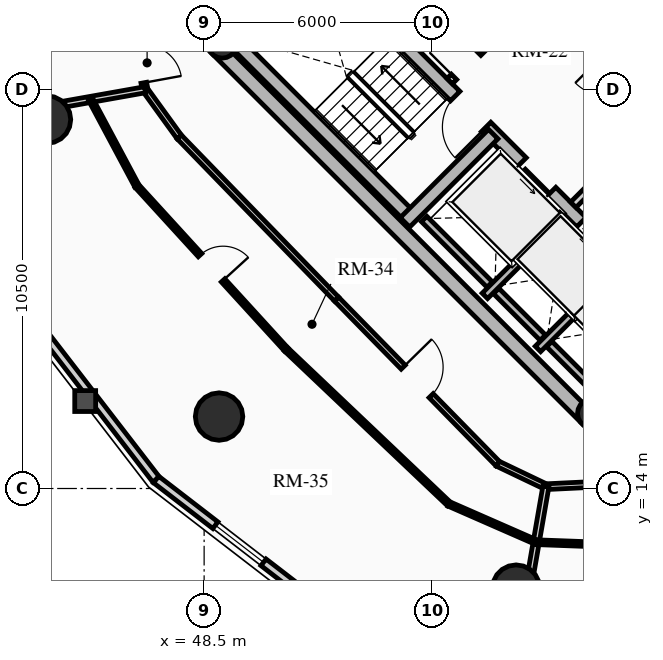
"""IFC4 building model, lengths in metres.
Left out: names, types, materials, properties, quantities, classifications, styles, units other than length and angle.
Written with IfcOpenShell. Run it as: python <this file> out.ifc"""

import sys

from ifc_helpers import new_model, si_unit, direction, frame, frame_2d, origin, origin_2d, place, context, subcontext, project, spatial, rectangle, circle, hollow_circle, extrude, source, transform, mapped, element, fill, save


model = new_model("IFC4")
c1 = context("Model", 3, precision=1e-05, world=origin(), true_north=direction((0.0, 1.0)))
c2 = subcontext(c1, "Body", "Model", "MODEL_VIEW")
j1 = project(units=[si_unit("LENGTHUNIT", "METRE"), si_unit("PLANEANGLEUNIT", "RADIAN")], contexts=[c1])
p1 = place(None, origin())
s1 = spatial("IfcSite", under=j1, at=p1, CompositionType="ELEMENT")
p2 = place(p1, origin())
s2 = spatial("IfcBuilding", under=s1, at=p2, CompositionType="ELEMENT")
p3 = place(p2, frame((0.0, 0.0, 163.24)))
s3 = spatial("IfcBuildingStorey", under=s2, at=p3, CompositionType="ELEMENT", Elevation=163.24)
for number, where, z_axis, x_axis in (
    (1, (58.702, 15.732, 0.0), (0.0, 0.0, 1.0), (-0.707, 0.707, 0.0)),
    (2, (66.268, 23.298, 0.0), (0.0, 0.0, 1.0), (-0.707, 0.707, 0.0)),
):
    element("IfcWall", number, at=place(p3, frame(where, z_axis=z_axis, x_axis=x_axis)), inside=s3, PredefinedType="SHEAR", context=c2, shape_type="SweptSolid", body=[
        extrude(rectangle(XDim=14.1, YDim=0.4, at=frame_2d((7.05, 0.0))), origin(), (0.0, 0.0, 1.0), 2.91),
    ])
p4 = place(p3, frame((58.561, 15.873, 0.0), z_axis=(0.0, 0.0, 1.0), x_axis=(0.707106781187, 0.707106781187, 0.0)))
e3 = element("IfcWall", 3, at=p4, inside=s3, PredefinedType="SHEAR", context=c2, shape_type="SweptSolid", body=[
    extrude(rectangle(XDim=10.7, YDim=0.4, at=frame_2d((5.35, 0.0))), origin(), (0.0, 0.0, 1.0), 2.91),
])
m1 = source(origin(), c2, "Body", "SweptSolid", [
    extrude(rectangle(XDim=1.5, YDim=2.02, at=frame_2d((0.75, 1.01))), frame((0.0, 0.21, 0.0), z_axis=(0.0, -1.0, 0.0), x_axis=(1.0, 0.0, 0.0)), (0.0, 0.0, 1.0), 0.42),
])
p5 = place(p4, frame((5.45, 0.0, 0.0)))
e4 = element("IfcOpeningElement", 4, at=p5, cuts=e3, PredefinedType="OPENING", context=c2, shape_type="MappedRepresentation", body=[
    mapped(m1, transform((0.0, 0.0, 0.0), x_axis=(1.0, 0.0, 0.0), y_axis=(0.0, 1.0, 0.0), z_axis=(0.0, 0.0, 1.0), scale=1.0)),
])
p6 = place(p3, frame((48.873, 25.561, 0.0), z_axis=(0.0, 0.0, 1.0), x_axis=(0.707106781187, 0.707106781187, 0.0)))
e5 = element("IfcWall", 5, at=p6, inside=s3, PredefinedType="SHEAR", context=c2, shape_type="SweptSolid", body=[
    extrude(rectangle(XDim=10.7, YDim=0.4, at=frame_2d((5.35, 0.0))), origin(), (0.0, 0.0, 1.0), 2.91),
])
p7 = place(p6, frame((4.6, 0.0, 0.0)))
e6 = element("IfcOpeningElement", 6, at=p7, cuts=e5, PredefinedType="OPENING", context=c2, shape_type="MappedRepresentation", body=[
    mapped(m1, transform((0.0, 0.0, 0.0), x_axis=(1.0, 0.0, 0.0), y_axis=(0.0, 1.0, 0.0), z_axis=(0.0, 0.0, 1.0), scale=1.0)),
])
p8 = place(p3, frame((61.06, 18.373, 0.0), z_axis=(0.0, 0.0, 1.0), x_axis=(-0.707106781187, 0.707106781187, 0.0)))
e7 = element("IfcWall", 7, at=p8, inside=s3, PredefinedType="SHEAR", context=c2, shape_type="SweptSolid", body=[
    extrude(rectangle(XDim=13.7, YDim=0.35, at=frame_2d((6.85, 0.0))), origin(), (0.0, 0.0, 1.0), 2.91),
])
m2 = source(origin(), c2, "Body", "SweptSolid", [
    extrude(rectangle(XDim=1.1, YDim=2.015, at=frame_2d((0.55, 1.007))), frame((0.0, 0.185, 0.0), z_axis=(0.0, -1.0, 0.0), x_axis=(1.0, 0.0, 0.0)), (0.0, 0.0, 1.0), 0.37),
])
p9 = place(p8, frame((4.85, 0.0, 0.0)))
e8 = element("IfcOpeningElement", 8, at=p9, cuts=e7, PredefinedType="OPENING", context=c2, shape_type="MappedRepresentation", body=[
    mapped(m2, transform((0.0, 0.0, 0.0), x_axis=(1.0, 0.0, 0.0), y_axis=(0.0, 1.0, 0.0), z_axis=(0.0, 0.0, 1.0), scale=1.0)),
])
p10 = place(p8, frame((0.625, 0.0, 0.0)))
e9 = element("IfcOpeningElement", 9, at=p10, cuts=e7, PredefinedType="OPENING", context=c2, shape_type="MappedRepresentation", body=[
    mapped(m2, transform((0.0, 0.0, 0.0), x_axis=(1.0, 0.0, 0.0), y_axis=(0.0, 1.0, 0.0), z_axis=(0.0, 0.0, 1.0), scale=1.0)),
])
p11 = place(p8, frame((2.625, 0.0, 0.0)))
e10 = element("IfcOpeningElement", 10, at=p11, cuts=e7, PredefinedType="OPENING", context=c2, shape_type="MappedRepresentation", body=[
    mapped(m2, transform((0.0, 0.0, 0.0), x_axis=(1.0, 0.0, 0.0), y_axis=(0.0, 1.0, 0.0), z_axis=(0.0, 0.0, 1.0), scale=1.0)),
])
m3 = source(origin(), c2, "Body", "SweptSolid", [
    extrude(rectangle(XDim=1.15, YDim=2.02, at=frame_2d((0.575, 1.01))), frame((0.0, 0.185, 0.0), z_axis=(0.0, -1.0, 0.0), x_axis=(1.0, 0.0, 0.0)), (0.0, 0.0, 1.0), 0.37),
])
p12 = place(p8, frame((7.27, 0.0, 0.0)))
e11 = element("IfcOpeningElement", 11, at=p12, cuts=e7, PredefinedType="OPENING", context=c2, shape_type="MappedRepresentation", body=[
    mapped(m3, transform((0.0, 0.0, 0.0), x_axis=(1.0, 0.0, 0.0), y_axis=(0.0, 1.0, 0.0), z_axis=(0.0, 0.0, 1.0), scale=1.0)),
])
p13 = place(p3, frame((63.627, 20.94, 0.0), z_axis=(0.0, 0.0, 1.0), x_axis=(-0.707119496762, 0.707094065383, 0.0)))
e12 = element("IfcWall", 12, at=p13, inside=s3, PredefinedType="SHEAR", context=c2, shape_type="SweptSolid", body=[
    extrude(rectangle(XDim=9.6, YDim=0.35, at=frame_2d((4.8, 0.0))), origin(), (0.0, 0.0, 1.0), 2.91),
])
p14 = place(p13, frame((5.28, 0.0, 0.0)))
e13 = element("IfcOpeningElement", 13, at=p14, cuts=e12, PredefinedType="OPENING", context=c2, shape_type="MappedRepresentation", body=[
    mapped(m3, transform((0.0, 0.0, 0.0), x_axis=(1.0, 0.0, 0.0), y_axis=(0.0, 1.0, 0.0), z_axis=(0.0, 0.0, 1.0), scale=1.0)),
])
p15 = place(p3, frame((53.922, 21.141, 0.0), z_axis=(0.0, 0.0, 1.0), x_axis=(-0.707106781187, 0.707106781187, 0.0)))
e14 = element("IfcWall", 14, at=p15, inside=s3, PredefinedType="SHEAR", context=c2, shape_type="SweptSolid", body=[
    extrude(rectangle(XDim=6.695, YDim=0.35, at=frame_2d((3.348, 0.0))), origin(), (0.0, 0.0, 1.0), 2.91),
])
p16 = place(p3, frame((53.784, 21.003, 0.0), z_axis=(0.0, 0.0, 1.0), x_axis=(0.707106781187, 0.707106781187, 0.0)))
e15 = element("IfcWall", 15, at=p16, inside=s3, PredefinedType="SHEAR", context=c2, shape_type="SweptSolid", body=[
    extrude(rectangle(XDim=3.285, YDim=0.35, at=frame_2d((1.643, 0.0))), origin(), (0.0, 0.0, 1.0), 2.91),
])
for number, where, z_axis, x_axis in (
    (16, (58.706, 15.976, 0.0), (0.0, 0.0, 1.0), (0.707, 0.707, 0.0)),
    (17, (48.976, 25.706, 0.0), (0.0, 0.0, 1.0), (0.707, 0.707, 0.0)),
):
    element("IfcColumn", number, at=place(p3, frame(where, z_axis=z_axis, x_axis=x_axis)), inside=s3, PredefinedType="COLUMN", context=c2, shape_type="SweptSolid", body=[
        extrude(hollow_circle(Radius=0.38, WallThickness=0.032, at=origin_2d()), origin(), (0.0, 0.0, 1.0), 2.91),
    ])
for number, where, z_axis, x_axis in (
    (18, (44.365, 23.709, 0.0), (0.0, 0.0, 1.0), (1.0, 0.0, 0.0)),
    (19, (48.893, 15.893, 0.0), (0.0, 0.0, 1.0), (1.0, 0.0, 0.0)),
    (20, (56.709, 11.365, 0.0), (0.0, 0.0, 1.0), (1.0, 0.0, 0.0)),
):
    element("IfcColumn", number, at=place(p3, frame(where, z_axis=z_axis, x_axis=x_axis)), inside=s3, PredefinedType="USERDEFINED", context=c2, shape_type="SweptSolid", body=[
        extrude(circle(Radius=0.625, at=origin_2d()), origin(), (0.0, 0.0, 1.0), 2.91),
    ])
p17 = place(p3, frame((47.236, 14.236, 0.0), z_axis=(0.0, 0.0, 1.0), x_axis=(-0.610543584779, 0.791982658323, 0.0)))
e21 = element("IfcWall", 21, at=p17, inside=s3, PredefinedType="SOLIDWALL", context=c2, shape_type="SweptSolid", body=[
    extrude(rectangle(XDim=5.537, YDim=0.22, at=frame_2d((2.769, 0.0))), origin(), (0.0, 0.0, 1.0), 2.245),
])
p18 = place(p3, frame((51.622, 10.856, 0.0), z_axis=(0.0, 0.0, 1.0), x_axis=(-0.791982658323, 0.610543584779, 0.0)))
e22 = element("IfcWall", 22, at=p18, inside=s3, PredefinedType="SOLIDWALL", context=c2, shape_type="SweptSolid", body=[
    extrude(rectangle(XDim=5.537, YDim=0.22, at=frame_2d((2.769, 0.0))), origin(), (0.0, 0.0, 1.0), 2.245),
])
m4 = source(origin(), c2, "Body", "SweptSolid", [
    extrude(rectangle(XDim=1.6, YDim=1.3, at=frame_2d((0.8, 0.65))), frame((0.0, 0.12, 0.0), z_axis=(0.0, -1.0, 0.0), x_axis=(1.0, 0.0, 0.0)), (0.0, 0.0, 1.0), 0.24),
])
p19 = place(p18, frame((1.968, 0.0, 0.65)))
e23 = element("IfcOpeningElement", 23, at=p19, cuts=e22, PredefinedType="OPENING", context=c2, shape_type="MappedRepresentation", body=[
    mapped(m4, transform((0.0, 0.0, 0.0), x_axis=(1.0, 0.0, 0.0), y_axis=(0.0, 1.0, 0.0), z_axis=(0.0, 0.0, 1.0), scale=1.0)),
])
p20 = place(p3, frame((55.888, 19.069, 0.0), z_axis=(0.0, 0.0, 1.0), x_axis=(0.707106781187, 0.707106781187, 0.0)))
e24 = element("IfcWall", 24, at=p20, inside=s3, PredefinedType="SHEAR", context=c2, shape_type="SweptSolid", body=[
    extrude(rectangle(XDim=2.97, YDim=0.2, at=frame_2d((1.485, 0.0))), origin(), (0.0, 0.0, 1.0), 2.91),
])
p21 = place(p3, frame((56.015, 19.366, 0.0), z_axis=(0.0, 0.0, 1.0), x_axis=(-0.707106781187, 0.707106781187, 0.0)))
e25 = element("IfcWall", 25, at=p21, inside=s3, PredefinedType="SHEAR", context=c2, shape_type="SweptSolid", body=[
    extrude(rectangle(XDim=2.44, YDim=0.2, at=frame_2d((1.22, 0.0))), origin(), (0.0, 0.0, 1.0), 2.91),
])
p22 = place(p3, frame((57.284, 17.673, 0.0), z_axis=(0.0, 0.0, 1.0), x_axis=(0.707147878904, 0.70706568108, 0.0)))
e26 = element("IfcWall", 26, at=p22, inside=s3, PredefinedType="SHEAR", context=c2, shape_type="SweptSolid", body=[
    extrude(rectangle(XDim=2.97, YDim=0.2, at=frame_2d((1.485, 0.0))), origin(), (0.0, 0.0, 1.0), 2.91),
])
p23 = place(p3, frame((57.412, 17.97, 0.0), z_axis=(0.0, 0.0, 1.0), x_axis=(-0.707106781187, 0.707106781187, 0.0)))
e27 = element("IfcWall", 27, at=p23, inside=s3, PredefinedType="SHEAR", context=c2, shape_type="SweptSolid", body=[
    extrude(rectangle(XDim=1.735, YDim=0.2, at=frame_2d((0.867, 0.0))), origin(), (0.0, 0.0, 1.0), 2.91),
])
p24 = place(p3, frame((58.737, 16.644, 0.0), z_axis=(0.0, 0.0, 1.0), x_axis=(-0.707032117043, 0.707181437447, 0.0)))
e28 = element("IfcWall", 28, at=p24, inside=s3, PredefinedType="SHEAR", context=c2, shape_type="SweptSolid", body=[
    extrude(rectangle(XDim=1.635, YDim=0.2, at=frame_2d((0.817, 0.0))), origin(), (0.0, 0.0, 1.0), 2.91),
])
p25 = place(p3, frame((58.214, 21.467, 0.0), z_axis=(0.0, 0.0, 1.0), x_axis=(0.707106781187, 0.707106781187, 0.0)))
e29 = element("IfcWall", 29, at=p25, inside=s3, PredefinedType="PARTITIONING", context=c2, shape_type="SweptSolid", body=[
    extrude(rectangle(XDim=3.28, YDim=0.2, at=frame_2d((1.64, 0.0))), origin(), (0.0, 0.0, 1.0), 2.675),
])
m5 = source(origin(), c2, "Body", "SweptSolid", [
    extrude(rectangle(XDim=1.5, YDim=2.02, at=frame_2d((0.75, 1.01))), frame((0.0, 0.11, 0.0), z_axis=(0.0, -1.0, 0.0), x_axis=(1.0, 0.0, 0.0)), (0.0, 0.0, 1.0), 0.22),
])
p26 = place(p25, frame((1.55, 0.0, 0.0)))
e30 = element("IfcOpeningElement", 30, at=p26, cuts=e29, PredefinedType="OPENING", context=c2, shape_type="MappedRepresentation", body=[
    mapped(m5, transform((0.0, 0.0, 0.0), x_axis=(1.0, 0.0, 0.0), y_axis=(0.0, 1.0, 0.0), z_axis=(0.0, 0.0, 1.0), scale=1.0)),
])
p27 = place(p3, frame((54.961, 24.719, 0.0), z_axis=(0.0, 0.0, 1.0), x_axis=(0.707106781187, 0.707106781187, 0.0)))
e31 = element("IfcWall", 31, at=p27, inside=s3, PredefinedType="PARTITIONING", context=c2, shape_type="SweptSolid", body=[
    extrude(rectangle(XDim=3.28, YDim=0.2, at=frame_2d((1.64, 0.0))), origin(), (0.0, 0.0, 1.0), 2.675),
])
m6 = source(origin(), c2, "Body", "SweptSolid", [
    extrude(rectangle(XDim=0.9, YDim=2.005, at=frame_2d((0.45, 1.002))), frame((0.0, 0.11, 0.0), z_axis=(0.0, -1.0, 0.0), x_axis=(1.0, 0.0, 0.0)), (0.0, 0.0, 1.0), 0.22),
])
p28 = place(p27, frame((0.16, 0.0, 0.0)))
e32 = element("IfcOpeningElement", 32, at=p28, cuts=e31, PredefinedType="OPENING", context=c2, shape_type="MappedRepresentation", body=[
    mapped(m6, transform((0.0, 0.0, 0.0), x_axis=(1.0, 0.0, 0.0), y_axis=(0.0, 1.0, 0.0), z_axis=(0.0, 0.0, 1.0), scale=1.0)),
])
p29 = place(p3, frame((46.699, 25.843, 0.0), z_axis=(0.0, 0.0, 1.0), x_axis=(0.180451258011, -0.983583928032, 0.0)))
e33 = element("IfcWall", 33, at=p29, inside=s3, PredefinedType="PARTITIONING", context=c2, shape_type="SweptSolid", body=[
    extrude(rectangle(XDim=1.372, YDim=0.15, at=frame_2d((0.686, 0.0))), origin(), (0.0, 0.0, 1.0), 2.245),
])
m7 = source(origin(), c2, "Body", "SweptSolid", [
    extrude(rectangle(XDim=1.0, YDim=2.015, at=frame_2d((0.5, 1.007))), frame((0.0, 0.085, 0.0), z_axis=(0.0, -1.0, 0.0), x_axis=(1.0, 0.0, 0.0)), (0.0, 0.0, 1.0), 0.17),
])
p30 = place(p29, frame((0.186, 0.0, 0.0)))
e34 = element("IfcOpeningElement", 34, at=p30, cuts=e33, PredefinedType="OPENING", context=c2, shape_type="MappedRepresentation", body=[
    mapped(m7, transform((0.0, 0.0, 0.0), x_axis=(1.0, 0.0, 0.0), y_axis=(0.0, 1.0, 0.0), z_axis=(0.0, 0.0, 1.0), scale=1.0)),
])
p31 = place(p3, frame((46.946, 24.494, 0.0), z_axis=(0.0, 0.0, 1.0), x_axis=(0.586340262528, -0.810064871809, 0.0)))
e35 = element("IfcWall", 35, at=p31, inside=s3, PredefinedType="PARTITIONING", context=c2, shape_type="SweptSolid", body=[
    extrude(rectangle(XDim=1.531, YDim=0.15, at=frame_2d((0.766, 0.0))), origin(), (0.0, 0.0, 1.0), 2.245),
])
p32 = place(p3, frame((47.844, 23.253, 0.0), z_axis=(0.0, 0.0, 1.0), x_axis=(0.696248411352, -0.717800912293, 0.0)))
e36 = element("IfcWall", 36, at=p32, inside=s3, PredefinedType="PARTITIONING", context=c2, shape_type="SweptSolid", body=[
    extrude(rectangle(XDim=5.947, YDim=0.15, at=frame_2d((2.974, 0.0))), origin(), (0.0, 0.0, 1.0), 2.675),
])
p33 = place(p3, frame((51.985, 18.985, 0.0), z_axis=(0.0, 0.0, 1.0), x_axis=(0.699619654291, -0.714515457726, 0.0)))
e37 = element("IfcWall", 37, at=p33, inside=s3, PredefinedType="PARTITIONING", context=c2, shape_type="SweptSolid", body=[
    extrude(rectangle(XDim=6.064, YDim=0.15, at=frame_2d((3.032, 0.0))), origin(), (0.0, 0.0, 1.0), 2.245),
])
m8 = source(origin(), c2, "Body", "SweptSolid", [
    extrude(rectangle(XDim=1.05, YDim=2.015, at=frame_2d((0.525, 1.007))), frame((0.0, 0.085, 0.0), z_axis=(0.0, -1.0, 0.0), x_axis=(1.0, 0.0, 0.0)), (0.0, 0.0, 1.0), 0.17),
])
p34 = place(p33, frame((2.507, 0.0, 0.0)))
e38 = element("IfcOpeningElement", 38, at=p34, cuts=e37, PredefinedType="OPENING", context=c2, shape_type="MappedRepresentation", body=[
    mapped(m8, transform((0.0, 0.0, 0.0), x_axis=(1.0, 0.0, 0.0), y_axis=(0.0, 1.0, 0.0), z_axis=(0.0, 0.0, 1.0), scale=1.0)),
])
p35 = place(p3, frame((56.227, 14.652, 0.0), z_axis=(0.0, 0.0, 1.0), x_axis=(0.902364039563, -0.430974639745, 0.0)))
e39 = element("IfcWall", 39, at=p35, inside=s3, PredefinedType="PARTITIONING", context=c2, shape_type="SweptSolid", body=[
    extrude(rectangle(XDim=1.401, YDim=0.15, at=frame_2d((0.701, 0.0))), origin(), (0.0, 0.0, 1.0), 2.245),
])
p36 = place(p3, frame((57.492, 14.048, 0.0), z_axis=(0.0, 0.0, 1.0), x_axis=(0.99885011351, 0.047942160364, 0.0)))
e40 = element("IfcWall", 40, at=p36, inside=s3, PredefinedType="PARTITIONING", context=c2, shape_type="SweptSolid", body=[
    extrude(rectangle(XDim=1.477, YDim=0.15, at=frame_2d((0.738, 0.0))), origin(), (0.0, 0.0, 1.0), 2.245),
])
p37 = place(p3, frame((46.946, 24.494, 0.0), z_axis=(0.0, 0.0, 1.0), x_axis=(-0.984604227647, -0.174798497988, 0.0)))
e41 = element("IfcWall", 41, at=p37, inside=s3, PredefinedType="PARTITIONING", context=c2, shape_type="SweptSolid", body=[
    extrude(rectangle(XDim=5.196, YDim=0.16, at=frame_2d((2.598, 0.0))), origin(), (0.0, 0.0, 1.0), 2.245),
])
p38 = place(p3, frame((57.492, 14.048, 0.0), z_axis=(0.0, 0.0, 1.0), x_axis=(-0.171191349619, -0.985237799628, 0.0)))
e42 = element("IfcWall", 42, at=p38, inside=s3, PredefinedType="PARTITIONING", context=c2, shape_type="SweptSolid", body=[
    extrude(rectangle(XDim=5.295, YDim=0.16, at=frame_2d((2.647, 0.0))), origin(), (0.0, 0.0, 1.0), 2.245),
])
p39 = place(p3, frame((45.514, 24.239, 0.0), z_axis=(0.0, 0.0, 1.0), x_axis=(0.471225296528, -0.882012879674, 0.0)))
e43 = element("IfcWall", 43, at=p39, inside=s3, PredefinedType="PARTITIONING", context=c2, shape_type="SweptSolid", body=[
    extrude(rectangle(XDim=2.585, YDim=0.125, at=frame_2d((1.292, 0.0))), origin(), (0.0, 0.0, 1.0), 2.245),
])
p40 = place(p3, frame((46.732, 21.959, 0.0), z_axis=(0.0, 0.0, 1.0), x_axis=(0.674328014222, -0.738431939474, 0.0)))
e44 = element("IfcWall", 44, at=p40, inside=s3, PredefinedType="PARTITIONING", context=c2, shape_type="SweptSolid", body=[
    extrude(rectangle(XDim=5.823, YDim=0.125, at=frame_2d((2.912, 0.0))), origin(), (0.0, 0.0, 1.0), 2.675),
])
m9 = source(origin(), c2, "Body", "SweptSolid", [
    extrude(rectangle(XDim=0.9, YDim=2.005, at=frame_2d((0.45, 1.002))), frame((0.0, 0.073, 0.0), z_axis=(0.0, -1.0, 0.0), x_axis=(1.0, 0.0, 0.0)), (0.0, 0.0, 1.0), 0.145),
])
p41 = place(p40, frame((2.462, 0.0, 0.0)))
e45 = element("IfcOpeningElement", 45, at=p41, cuts=e44, PredefinedType="OPENING", context=c2, shape_type="MappedRepresentation", body=[
    mapped(m9, transform((0.0, 0.0, 0.0), x_axis=(1.0, 0.0, 0.0), y_axis=(0.0, 1.0, 0.0), z_axis=(0.0, 0.0, 1.0), scale=1.0)),
])
p42 = place(p3, frame((50.659, 17.659, 0.0), z_axis=(0.0, 0.0, 1.0), x_axis=(0.72516873678, -0.688571204159, 0.0)))
e46 = element("IfcWall", 46, at=p42, inside=s3, PredefinedType="PARTITIONING", context=c2, shape_type="SweptSolid", body=[
    extrude(rectangle(XDim=5.904, YDim=0.125, at=frame_2d((2.952, 0.0))), origin(), (0.0, 0.0, 1.0), 2.245),
])
p43 = place(p3, frame((54.94, 13.594, 0.0), z_axis=(0.0, 0.0, 1.0), x_axis=(0.915898070967, -0.401410916143, 0.0)))
e47 = element("IfcWall", 47, at=p43, inside=s3, PredefinedType="PARTITIONING", context=c2, shape_type="SweptSolid", body=[
    extrude(rectangle(XDim=2.509, YDim=0.125, at=frame_2d((1.254, 0.0))), origin(), (0.0, 0.0, 1.0), 2.245),
])
p44 = place(p3, frame((57.238, 12.587, 0.0), z_axis=(0.0, 0.0, 1.0), x_axis=(0.999316318576, -0.036971548882, 0.0)))
e48 = element("IfcWall", 48, at=p44, inside=s3, PredefinedType="PARTITIONING", context=c2, shape_type="SweptSolid", body=[
    extrude(rectangle(XDim=2.476, YDim=0.125, at=frame_2d((1.238, 0.0))), origin(), (0.0, 0.0, 1.0), 2.245),
])
m10 = source(origin(), c2, "Body", "SweptSolid", [
    extrude(rectangle(XDim=1.6, YDim=1.3, at=frame_2d((0.8, 0.65))), frame((0.0, 0.03, 0.0), z_axis=(0.0, -1.0, 0.0), x_axis=(1.0, 0.0, 0.0)), (0.0, 0.0, 1.0), 0.06),
])
p45 = place(p19, origin())
e49 = element("IfcWindow", 49, at=p45, inside=s3, PartitioningType="SINGLE_PANEL", PredefinedType="WINDOW", context=c2, shape_type="MappedRepresentation", body=[
    mapped(m10, transform((0.0, 0.0, 0.0), x_axis=(1.0, 0.0, 0.0), y_axis=(0.0, 1.0, 0.0), z_axis=(0.0, 0.0, 1.0), scale=1.0)),
])
fill(e23, e49)
m11 = source(origin(), c2, "Body", "SweptSolid", [
    extrude(rectangle(XDim=1.1, YDim=2.015, at=frame_2d((0.55, 1.007))), frame((0.0, 0.025, 0.0), z_axis=(0.0, -1.0, 0.0), x_axis=(1.0, 0.0, 0.0)), (0.0, 0.0, 1.0), 0.05),
])
p46 = place(p9, origin())
e50 = element("IfcDoor", 50, at=p46, inside=s3, OperationType="SLIDING_TO_LEFT", PredefinedType="DOOR", context=c2, shape_type="MappedRepresentation", body=[
    mapped(m11, transform((0.0, 0.0, 0.0), x_axis=(1.0, 0.0, 0.0), y_axis=(0.0, 1.0, 0.0), z_axis=(0.0, 0.0, 1.0), scale=1.0)),
])
fill(e8, e50)
p47 = place(p11, origin())
e51 = element("IfcDoor", 51, at=p47, inside=s3, OperationType="SLIDING_TO_LEFT", PredefinedType="DOOR", context=c2, shape_type="MappedRepresentation", body=[
    mapped(m11, transform((0.0, 0.0, 0.0), x_axis=(1.0, 0.0, 0.0), y_axis=(0.0, 1.0, 0.0), z_axis=(0.0, 0.0, 1.0), scale=1.0)),
])
fill(e10, e51)
m12 = source(origin(), c2, "Body", "SweptSolid", [
    extrude(rectangle(XDim=1.15, YDim=2.02, at=frame_2d((0.575, 1.01))), frame((0.0, 0.025, 0.0), z_axis=(0.0, -1.0, 0.0), x_axis=(1.0, 0.0, 0.0)), (0.0, 0.0, 1.0), 0.05),
])
p48 = place(p12, origin())
e52 = element("IfcDoor", 52, at=p48, inside=s3, OperationType="SINGLE_SWING_LEFT", PredefinedType="DOOR", context=c2, shape_type="MappedRepresentation", body=[
    mapped(m12, transform((0.0, 0.0, 0.0), x_axis=(1.0, 0.0, 0.0), y_axis=(0.0, 1.0, 0.0), z_axis=(0.0, 0.0, 1.0), scale=1.0)),
])
fill(e11, e52)
m13 = source(origin(), c2, "Body", "SweptSolid", [
    extrude(rectangle(XDim=0.9, YDim=2.005, at=frame_2d((0.45, 1.002))), frame((0.0, 0.025, 0.0), z_axis=(0.0, -1.0, 0.0), x_axis=(1.0, 0.0, 0.0)), (0.0, 0.0, 1.0), 0.05),
])
p49 = place(p28, origin())
e53 = element("IfcDoor", 53, at=p49, inside=s3, OperationType="SINGLE_SWING_LEFT", PredefinedType="DOOR", context=c2, shape_type="MappedRepresentation", body=[
    mapped(m13, transform((0.0, 0.0, 0.0), x_axis=(1.0, 0.0, 0.0), y_axis=(0.0, 1.0, 0.0), z_axis=(0.0, 0.0, 1.0), scale=1.0)),
])
fill(e32, e53)
m14 = source(origin(), c2, "Body", "SweptSolid", [
    extrude(rectangle(XDim=1.0, YDim=2.015, at=frame_2d((0.5, 1.007))), frame((0.0, 0.025, 0.0), z_axis=(0.0, -1.0, 0.0), x_axis=(1.0, 0.0, 0.0)), (0.0, 0.0, 1.0), 0.05),
])
p50 = place(p30, origin())
e54 = element("IfcDoor", 54, at=p50, inside=s3, OperationType="SINGLE_SWING_RIGHT", PredefinedType="DOOR", context=c2, shape_type="MappedRepresentation", body=[
    mapped(m14, transform((0.0, 0.0, 0.0), x_axis=(1.0, 0.0, 0.0), y_axis=(0.0, 1.0, 0.0), z_axis=(0.0, 0.0, 1.0), scale=1.0)),
])
fill(e34, e54)
m15 = source(origin(), c2, "Body", "SweptSolid", [
    extrude(rectangle(XDim=1.05, YDim=2.015, at=frame_2d((0.525, 1.007))), frame((0.0, 0.025, 0.0), z_axis=(0.0, -1.0, 0.0), x_axis=(1.0, 0.0, 0.0)), (0.0, 0.0, 1.0), 0.05),
])
p51 = place(p34, origin())
e55 = element("IfcDoor", 55, at=p51, inside=s3, OperationType="SINGLE_SWING_LEFT", PredefinedType="DOOR", context=c2, shape_type="MappedRepresentation", body=[
    mapped(m15, transform((0.0, 0.0, 0.0), x_axis=(1.0, 0.0, 0.0), y_axis=(0.0, 1.0, 0.0), z_axis=(0.0, 0.0, 1.0), scale=1.0)),
])
fill(e38, e55)
p52 = place(p41, origin())
e56 = element("IfcDoor", 56, at=p52, inside=s3, OperationType="SINGLE_SWING_RIGHT", PredefinedType="DOOR", context=c2, shape_type="MappedRepresentation", body=[
    mapped(m13, transform((0.0, 0.0, 0.0), x_axis=(1.0, 0.0, 0.0), y_axis=(0.0, 1.0, 0.0), z_axis=(0.0, 0.0, 1.0), scale=1.0)),
])
fill(e45, e56)
save(model, sys.argv[1])
